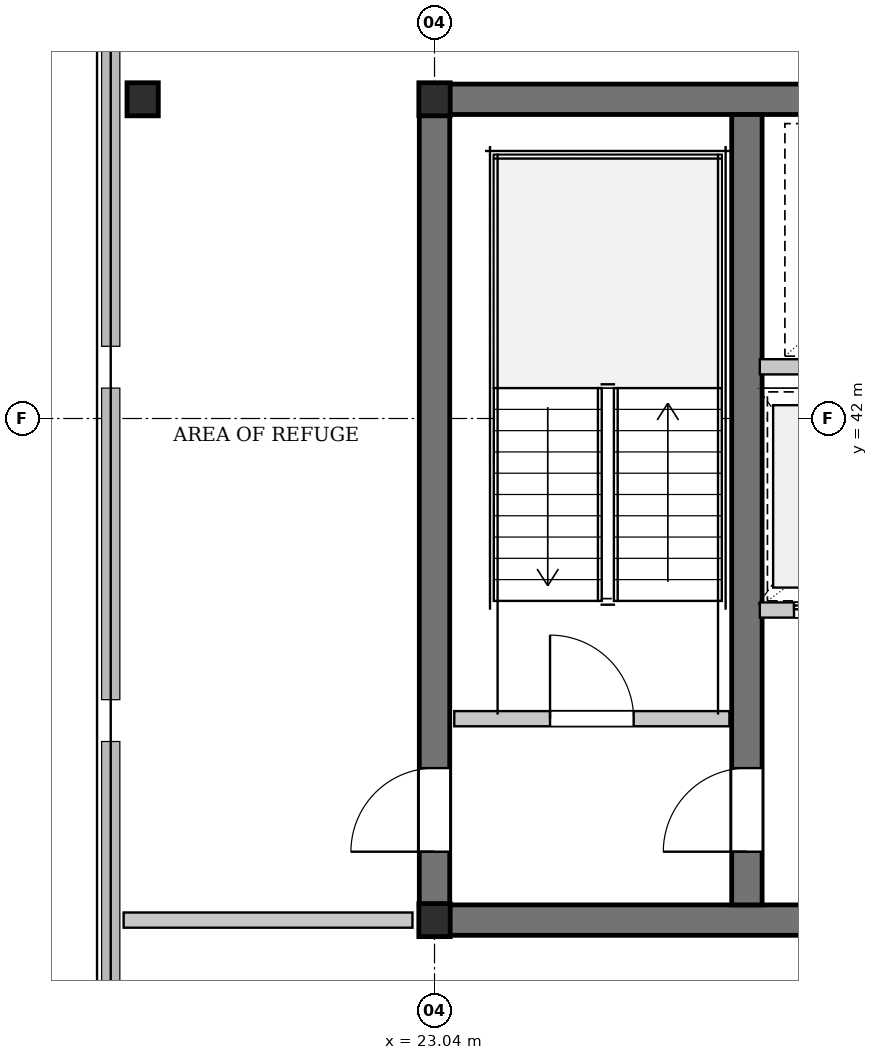
"""IFC4 building model, lengths in metres.
Left out: names, types, materials, properties, quantities, classifications, styles, units other than length and angle.
Written with IfcOpenShell. Run it as: python <this file> out.ifc"""

import sys

from ifc_helpers import new_model, si_unit, direction, frame, frame_2d, origin, origin_2d, place, context, subcontext, project, spatial, rectangle, i_section, extrude, element, fill, save


model = new_model("IFC4")
c1 = context("Model", 3, precision=1e-05, world=origin(), true_north=direction((0.0, 1.0)))
c2 = subcontext(c1, "Body", "Model", "MODEL_VIEW")
j1 = project(units=[si_unit("LENGTHUNIT", "METRE"), si_unit("PLANEANGLEUNIT", "RADIAN")], contexts=[c1])
p1 = place(None, origin())
s1 = spatial("IfcSite", under=j1, at=p1, CompositionType="ELEMENT")
p2 = place(p1, origin())
s2 = spatial("IfcBuilding", under=s1, at=p2, CompositionType="ELEMENT")
p3 = place(p2, frame((0.0, 0.0, 251.3)))
s3 = spatial("IfcBuildingStorey", under=s2, at=p3, CompositionType="ELEMENT", Elevation=251.3)
p4 = place(p3, frame((22.84, 46.2, 0.0), z_axis=(0.0, 0.0, 1.0), x_axis=(1.0, 0.0, 0.0)))
e1 = element("IfcWall", 1, at=p4, inside=s3, PredefinedType="SHEAR", context=c2, shape_type="SweptSolid", body=[
    extrude(rectangle(XDim=31.12, YDim=0.4, at=frame_2d((15.56, 0.0))), origin(), (0.0, 0.0, 1.0), 3.48),
])
p5 = place(p3, frame((22.84, 35.4, 0.0), z_axis=(0.0, 0.0, 1.0), x_axis=(1.0, 0.0, 0.0)))
e2 = element("IfcWall", 2, at=p5, inside=s3, PredefinedType="SHEAR", context=c2, shape_type="SweptSolid", body=[
    extrude(rectangle(XDim=5.36, YDim=0.4, at=frame_2d((2.68, 0.0))), origin(), (0.0, 0.0, 1.0), 3.48),
])
p6 = place(p3, frame((23.04, 35.6, 0.0), z_axis=(0.0, 0.0, 1.0), x_axis=(0.0, 1.0, 0.0)))
e3 = element("IfcWall", 3, at=p6, inside=s3, PredefinedType="SHEAR", context=c2, shape_type="SweptSolid", body=[
    extrude(rectangle(XDim=10.4, YDim=0.4, at=frame_2d((5.2, 0.0))), origin(), (0.0, 0.0, 1.0), 3.48),
])
p7 = place(p6, frame((0.7, 0.0, 0.0)))
e4 = element("IfcOpeningElement", 4, at=p7, cuts=e3, PredefinedType="OPENING", context=c2, shape_type="SweptSolid", body=[
    extrude(rectangle(XDim=1.1, YDim=2.15, at=frame_2d((0.55, 1.075))), frame((0.0, 0.21, 0.0), z_axis=(0.0, -1.0, 0.0), x_axis=(1.0, 0.0, 0.0)), (0.0, 0.0, 1.0), 0.42),
])
p8 = place(p3, frame((27.15, 35.6, 0.0), z_axis=(0.0, 0.0, 1.0), x_axis=(0.0, 1.0, 0.0)))
e5 = element("IfcWall", 5, at=p8, inside=s3, PredefinedType="SHEAR", context=c2, shape_type="SweptSolid", body=[
    extrude(rectangle(XDim=10.4, YDim=0.4, at=frame_2d((5.2, 0.0))), origin(), (0.0, 0.0, 1.0), 3.48),
])
p9 = place(p8, frame((0.7, 0.0, 0.0)))
e6 = element("IfcOpeningElement", 6, at=p9, cuts=e5, PredefinedType="OPENING", context=c2, shape_type="SweptSolid", body=[
    extrude(rectangle(XDim=1.1, YDim=2.15, at=frame_2d((0.55, 1.075))), frame((0.0, 0.21, 0.0), z_axis=(0.0, -1.0, 0.0), x_axis=(1.0, 0.0, 0.0)), (0.0, 0.0, 1.0), 0.42),
])
for number, where, z_axis, x_axis in (
    (7, (23.04, 35.4, 0.0), (0.0, 0.0, 1.0), (1.0, 0.0, 0.0)),
    (8, (23.04, 46.2, 0.0), (0.0, 0.0, 1.0), (1.0, 0.0, 0.0)),
    (9, (19.2, 46.2, 0.0), (0.0, 0.0, 1.0), (1.0, 0.0, 0.0)),
):
    element("IfcColumn", number, at=place(p3, frame(where, z_axis=z_axis, x_axis=x_axis)), inside=s3, PredefinedType="COLUMN", context=c2, shape_type="SweptSolid", body=[
        extrude(i_section(OverallWidth=0.412, OverallDepth=0.435, WebThickness=0.036, FlangeThickness=0.058, FilletRadius=0.015, at=origin_2d()), origin(), (0.0, 0.0, 1.0), 3.9),
    ])
p10 = place(p3, frame((23.3, 38.05, 0.0), z_axis=(0.0, 0.0, 1.0), x_axis=(1.0, 0.0, 0.0)))
e10 = element("IfcWall", 10, at=p10, inside=s3, PredefinedType="PARTITIONING", context=c2, shape_type="SweptSolid", body=[
    extrude(rectangle(XDim=3.62, YDim=0.2, at=frame_2d((1.81, 0.0))), origin(), (0.0, 0.0, 1.0), 3.48),
])
p11 = place(p10, frame((1.26, 0.0, 0.0)))
e11 = element("IfcOpeningElement", 11, at=p11, cuts=e10, PredefinedType="OPENING", context=c2, shape_type="SweptSolid", body=[
    extrude(rectangle(XDim=1.1, YDim=2.15, at=frame_2d((0.55, 1.075))), frame((0.0, 0.11, 0.0), z_axis=(0.0, -1.0, 0.0), x_axis=(1.0, 0.0, 0.0)), (0.0, 0.0, 1.0), 0.22),
])
p12 = place(p3, frame((27.32, 39.48, 0.0), z_axis=(0.0, 0.0, 1.0), x_axis=(1.0, 0.0, 0.0)))
e12 = element("IfcWall", 12, at=p12, inside=s3, PredefinedType="PARTITIONING", context=c2, shape_type="SweptSolid", body=[
    extrude(rectangle(XDim=3.94, YDim=0.2, at=frame_2d((1.97, 0.0))), origin(), (0.0, 0.0, 1.0), 3.48),
])
p13 = place(p12, frame((0.45, 0.0, 0.0)))
e13 = element("IfcOpeningElement", 13, at=p13, cuts=e12, PredefinedType="OPENING", context=c2, shape_type="SweptSolid", body=[
    extrude(rectangle(XDim=1.1, YDim=2.2, at=frame_2d((0.55, 1.1))), frame((0.0, 0.11, 0.0), z_axis=(0.0, -1.0, 0.0), x_axis=(1.0, 0.0, 0.0)), (0.0, 0.0, 1.0), 0.22),
])
p14 = place(p12, frame((2.41, 0.0, 0.0)))
e14 = element("IfcOpeningElement", 14, at=p14, cuts=e12, PredefinedType="OPENING", context=c2, shape_type="SweptSolid", body=[
    extrude(rectangle(XDim=1.1, YDim=2.2, at=frame_2d((0.55, 1.1))), frame((0.0, 0.11, 0.0), z_axis=(0.0, -1.0, 0.0), x_axis=(1.0, 0.0, 0.0)), (0.0, 0.0, 1.0), 0.22),
])
p15 = place(p3, frame((27.32, 42.68, 0.0), z_axis=(0.0, 0.0, 1.0), x_axis=(1.0, 0.0, 0.0)))
e15 = element("IfcWall", 15, at=p15, inside=s3, PredefinedType="PARTITIONING", context=c2, shape_type="SweptSolid", body=[
    extrude(rectangle(XDim=5.33, YDim=0.2, at=frame_2d((2.665, 0.0))), origin(), (0.0, 0.0, 1.0), 3.48),
])
p16 = place(p15, frame((4.18, 0.0, 0.0)))
e16 = element("IfcOpeningElement", 16, at=p16, cuts=e15, PredefinedType="OPENING", context=c2, shape_type="SweptSolid", body=[
    extrude(rectangle(XDim=0.9, YDim=2.15, at=frame_2d((0.45, 1.075))), frame((0.0, 0.11, 0.0), z_axis=(0.0, -1.0, 0.0), x_axis=(1.0, 0.0, 0.0)), (0.0, 0.0, 1.0), 0.22),
])
p17 = place(p3, frame((18.95, 35.4, 0.0), z_axis=(0.0, 0.0, 1.0), x_axis=(1.0, 0.0, 0.0)))
e17 = element("IfcWall", 17, at=p17, inside=s3, PredefinedType="PARTITIONING", context=c2, shape_type="SweptSolid", body=[
    extrude(rectangle(XDim=3.8, YDim=0.2, at=frame_2d((1.9, 0.0))), origin(), (0.0, 0.0, 1.0), 3.48),
])
p18 = place(p11, origin())
e18 = element("IfcDoor", 18, at=p18, inside=s3, OperationType="SINGLE_SWING_LEFT", PredefinedType="DOOR", context=c2, shape_type="SweptSolid", body=[
    extrude(rectangle(XDim=1.1, YDim=2.15, at=frame_2d((0.55, 1.075))), frame((0.0, 0.025, 0.0), z_axis=(0.0, -1.0, 0.0), x_axis=(1.0, 0.0, 0.0)), (0.0, 0.0, 1.0), 0.05),
])
fill(e11, e18)
p19 = place(p13, origin())
e19 = element("IfcDoor", 19, at=p19, inside=s3, OperationType="DOUBLE_DOOR_SLIDING", PredefinedType="DOOR", context=c2, shape_type="SweptSolid", body=[
    extrude(rectangle(XDim=1.1, YDim=2.2, at=frame_2d((0.55, 1.1))), frame((0.0, 0.025, 0.0), z_axis=(0.0, -1.0, 0.0), x_axis=(1.0, 0.0, 0.0)), (0.0, 0.0, 1.0), 0.05),
])
fill(e13, e19)
p20 = place(p9, origin())
e20 = element("IfcDoor", 20, at=p20, inside=s3, OperationType="SINGLE_SWING_LEFT", PredefinedType="DOOR", context=c2, shape_type="SweptSolid", body=[
    extrude(rectangle(XDim=1.1, YDim=2.15, at=frame_2d((0.55, 1.075))), frame((0.0, 0.025, 0.0), z_axis=(0.0, -1.0, 0.0), x_axis=(1.0, 0.0, 0.0)), (0.0, 0.0, 1.0), 0.05),
])
fill(e6, e20)
p21 = place(p7, origin())
e21 = element("IfcDoor", 21, at=p21, inside=s3, OperationType="SINGLE_SWING_LEFT", PredefinedType="DOOR", context=c2, shape_type="SweptSolid", body=[
    extrude(rectangle(XDim=1.1, YDim=2.15, at=frame_2d((0.55, 1.075))), frame((0.0, 0.025, 0.0), z_axis=(0.0, -1.0, 0.0), x_axis=(1.0, 0.0, 0.0)), (0.0, 0.0, 1.0), 0.05),
])
fill(e4, e21)
save(model, sys.argv[1])
